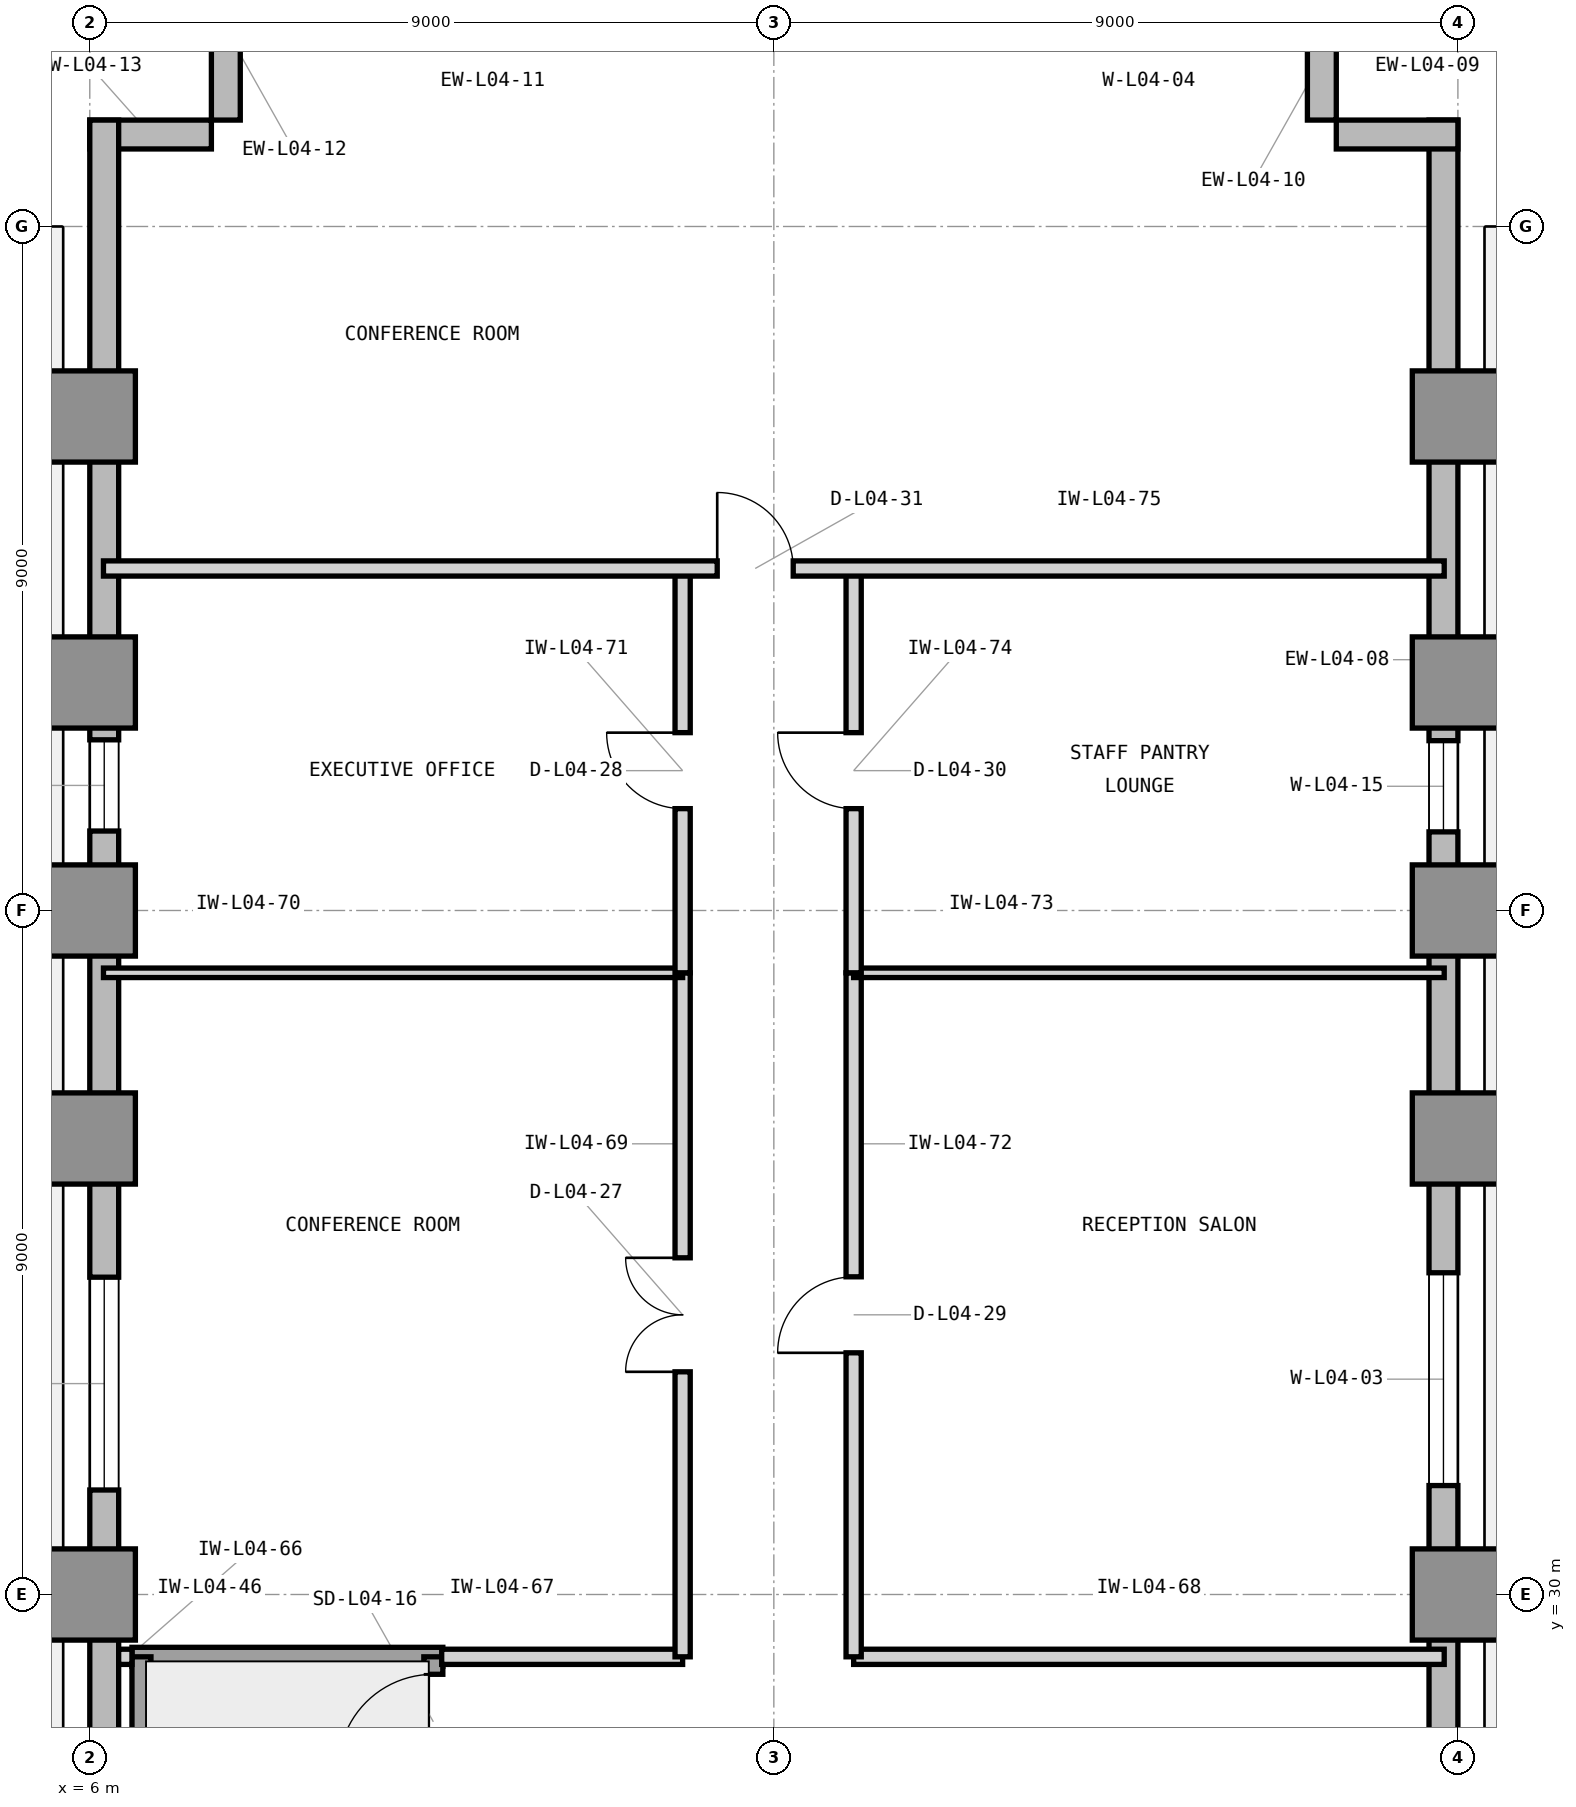
"""IFC4 building model, lengths in metres.
Left out: names, types, materials, properties, quantities, classifications, styles, units other than length and angle.
Written with IfcOpenShell. Run it as: python <this file> out.ifc"""

import sys

from ifc_helpers import new_model, si_unit, direction, frame, frame_2d, origin, origin_2d, place, context, subcontext, project, spatial, rectangle, extrude, element, fill, save


model = new_model("IFC4")
c1 = context("Model", 3, precision=1e-05, world=origin(), true_north=direction((0.0, 1.0)))
c2 = subcontext(c1, "Body", "Model", "MODEL_VIEW")
j1 = project(units=[si_unit("LENGTHUNIT", "METRE"), si_unit("PLANEANGLEUNIT", "RADIAN")], contexts=[c1])
p1 = place(None, origin())
s1 = spatial("IfcSite", under=j1, at=p1, CompositionType="ELEMENT")
p2 = place(p1, origin())
s2 = spatial("IfcBuilding", under=s1, at=p2, CompositionType="ELEMENT")
p3 = place(p2, frame((0.0, 0.0, 21.6)))
s3 = spatial("IfcBuildingStorey", under=s2, at=p3, CompositionType="ELEMENT", Elevation=21.6)
for number, where, z_axis, x_axis in (
    (1, (6.0, 30.0, 0.0), (0.0, 0.0, 1.0), (1.0, 0.0, 0.0)),
    (2, (24.0, 30.0, 0.0), (0.0, 0.0, 1.0), (1.0, 0.0, 0.0)),
    (3, (6.0, 36.0, 0.0), (0.0, 0.0, 1.0), (1.0, 0.0, 0.0)),
    (4, (24.0, 36.0, 0.0), (0.0, 0.0, 1.0), (1.0, 0.0, 0.0)),
    (5, (6.0, 39.0, 0.0), (0.0, 0.0, 1.0), (1.0, 0.0, 0.0)),
    (6, (24.0, 39.0, 0.0), (0.0, 0.0, 1.0), (1.0, 0.0, 0.0)),
    (7, (6.0, 42.0, 0.0), (0.0, 0.0, 1.0), (1.0, 0.0, 0.0)),
    (8, (24.0, 42.0, 0.0), (0.0, 0.0, 1.0), (1.0, 0.0, 0.0)),
    (9, (6.0, 45.5, 0.0), (0.0, 0.0, 1.0), (1.0, 0.0, 0.0)),
    (10, (24.0, 45.5, 0.0), (0.0, 0.0, 1.0), (1.0, 0.0, 0.0)),
):
    element("IfcColumn", number, at=place(p3, frame(where, z_axis=z_axis, x_axis=x_axis)), inside=s3, PredefinedType="COLUMN", context=c2, shape_type="SweptSolid", body=[
        extrude(rectangle(XDim=1.2, YDim=1.2, at=origin_2d()), origin(), (0.0, 0.0, 1.0), 4.2),
    ])
p4 = place(p3, frame((23.81, 21.0, 0.0), z_axis=(0.0, 0.0, 1.0), x_axis=(0.0, 1.0, 0.0)))
e11 = element("IfcWall", 11, at=p4, inside=s3, PredefinedType="STANDARD", context=c2, shape_type="SweptSolid", body=[
    extrude(rectangle(XDim=28.4, YDim=0.38, at=frame_2d((14.2, 0.0))), origin(), (0.0, 0.0, 1.0), 3.98),
])
p5 = place(p4, frame((10.433, 0.0, 0.85)))
e12 = element("IfcOpeningElement", 12, at=p5, cuts=e11, PredefinedType="OPENING", context=c2, shape_type="SweptSolid", body=[
    extrude(rectangle(XDim=2.8, YDim=2.45, at=frame_2d((1.4, 1.225))), frame((0.0, 0.2, 0.0), z_axis=(0.0, -1.0, 0.0), x_axis=(1.0, 0.0, 0.0)), (0.0, 0.0, 1.0), 0.4),
])
p6 = place(p4, frame((19.034, 0.0, 0.85)))
e13 = element("IfcOpeningElement", 13, at=p6, cuts=e11, PredefinedType="OPENING", context=c2, shape_type="SweptSolid", body=[
    extrude(rectangle(XDim=1.2, YDim=2.45, at=frame_2d((0.6, 1.225))), frame((0.0, 0.2, 0.0), z_axis=(0.0, -1.0, 0.0), x_axis=(1.0, 0.0, 0.0)), (0.0, 0.0, 1.0), 0.4),
])
for number, where, z_axis, x_axis in (
    (14, (24.0, 49.21, 0.0), (0.0, 0.0, 1.0), (-1.0, 0.0, 0.0)),
    (15, (22.21, 49.4, 0.0), (0.0, 0.0, 1.0), (0.0, 1.0, 0.0)),
    (16, (7.79, 51.0, 0.0), (0.0, 0.0, 1.0), (0.0, -1.0, 0.0)),
    (17, (7.6, 49.21, 0.0), (0.0, 0.0, 1.0), (-1.0, 0.0, 0.0)),
):
    element("IfcWall", number, at=place(p3, frame(where, z_axis=z_axis, x_axis=x_axis)), inside=s3, PredefinedType="STANDARD", context=c2, shape_type="SweptSolid", body=[
        extrude(rectangle(XDim=1.6, YDim=0.38, at=frame_2d((0.8, 0.0))), origin(), (0.0, 0.0, 1.0), 3.98),
    ])
p7 = place(p3, frame((6.19, 49.4, 0.0), z_axis=(0.0, 0.0, 1.0), x_axis=(0.0, -1.0, 0.0)))
e18 = element("IfcWall", 18, at=p7, inside=s3, PredefinedType="STANDARD", context=c2, shape_type="SweptSolid", body=[
    extrude(rectangle(XDim=28.5, YDim=0.38, at=frame_2d((14.25, 0.0))), origin(), (0.0, 0.0, 1.0), 3.98),
])
p8 = place(p7, frame((15.225, 0.0, 0.85)))
e19 = element("IfcOpeningElement", 19, at=p8, cuts=e18, PredefinedType="OPENING", context=c2, shape_type="SweptSolid", body=[
    extrude(rectangle(XDim=2.8, YDim=2.45, at=frame_2d((1.4, 1.225))), frame((0.0, 0.2, 0.0), z_axis=(0.0, -1.0, 0.0), x_axis=(1.0, 0.0, 0.0)), (0.0, 0.0, 1.0), 0.4),
])
p9 = place(p7, frame((8.154, 0.0, 0.85)))
e20 = element("IfcOpeningElement", 20, at=p9, cuts=e18, PredefinedType="OPENING", context=c2, shape_type="SweptSolid", body=[
    extrude(rectangle(XDim=1.2, YDim=2.45, at=frame_2d((0.6, 1.225))), frame((0.0, 0.2, 0.0), z_axis=(0.0, -1.0, 0.0), x_axis=(1.0, 0.0, 0.0)), (0.0, 0.0, 1.0), 0.4),
])
p10 = place(p3, frame((6.555, 29.18, 0.0), z_axis=(0.0, 0.0, 1.0), x_axis=(1.0, 0.0, 0.0)))
e21 = element("IfcWall", 21, at=p10, inside=s3, PredefinedType="SHEAR", context=c2, shape_type="SweptSolid", body=[
    extrude(rectangle(XDim=4.09, YDim=0.25, at=frame_2d((2.045, 0.0))), origin(), (0.0, 0.0, 1.0), 4.2),
])
p11 = place(p3, frame((6.68, 21.68, 0.0), z_axis=(0.0, 0.0, 1.0), x_axis=(0.0, 1.0, 0.0)))
e22 = element("IfcWall", 22, at=p11, inside=s3, PredefinedType="SHEAR", context=c2, shape_type="SweptSolid", body=[
    extrude(rectangle(XDim=7.5, YDim=0.25, at=frame_2d((3.75, 0.0))), origin(), (0.0, 0.0, 1.0), 4.2),
])
p12 = place(p3, frame((10.52, 21.68, 0.0), z_axis=(0.0, 0.0, 1.0), x_axis=(0.0, 1.0, 0.0)))
e23 = element("IfcWall", 23, at=p12, inside=s3, PredefinedType="SHEAR", context=c2, shape_type="SweptSolid", body=[
    extrude(rectangle(XDim=7.5, YDim=0.25, at=frame_2d((3.75, 0.0))), origin(), (0.0, 0.0, 1.0), 4.2),
])
p13 = place(p12, frame((6.02, 0.0, 0.0)))
e24 = element("IfcOpeningElement", 24, at=p13, cuts=e23, PredefinedType="OPENING", context=c2, shape_type="SweptSolid", body=[
    extrude(rectangle(XDim=1.25, YDim=2.2, at=frame_2d((0.625, 1.1))), frame((0.0, 0.135, 0.0), z_axis=(0.0, -1.0, 0.0), x_axis=(1.0, 0.0, 0.0)), (0.0, 0.0, 1.0), 0.27),
])
p14 = place(p3, frame((6.38, 29.18, 0.0), z_axis=(0.0, 0.0, 1.0), x_axis=(1.0, 0.0, 0.0)))
e25 = element("IfcWall", 25, at=p14, inside=s3, PredefinedType="PARTITIONING", context=c2, shape_type="SweptSolid", body=[
    extrude(rectangle(XDim=0.175, YDim=0.2, at=frame_2d((0.087, 0.0))), origin(), (0.0, 0.0, 1.0), 3.97),
])
p15 = place(p3, frame((10.63, 29.18, 0.0), z_axis=(0.0, 0.0, 1.0), x_axis=(1.0, 0.0, 0.0)))
e26 = element("IfcWall", 26, at=p15, inside=s3, PredefinedType="PARTITIONING", context=c2, shape_type="SweptSolid", body=[
    extrude(rectangle(XDim=3.17, YDim=0.2, at=frame_2d((1.585, 0.0))), origin(), (0.0, 0.0, 1.0), 3.97),
])
p16 = place(p3, frame((16.05, 29.18, 0.0), z_axis=(0.0, 0.0, 1.0), x_axis=(1.0, 0.0, 0.0)))
e27 = element("IfcWall", 27, at=p16, inside=s3, PredefinedType="PARTITIONING", context=c2, shape_type="SweptSolid", body=[
    extrude(rectangle(XDim=7.77, YDim=0.2, at=frame_2d((3.885, 0.0))), origin(), (0.0, 0.0, 1.0), 3.97),
])
p17 = place(p3, frame((13.8, 29.18, 0.0), z_axis=(0.0, 0.0, 1.0), x_axis=(0.0, 1.0, 0.0)))
e28 = element("IfcWall", 28, at=p17, inside=s3, PredefinedType="PARTITIONING", context=c2, shape_type="SweptSolid", body=[
    extrude(rectangle(XDim=9.0, YDim=0.2, at=frame_2d((4.5, 0.0))), origin(), (0.0, 0.0, 1.0), 3.97),
])
p18 = place(p17, frame((3.75, 0.0, 0.0)))
e29 = element("IfcOpeningElement", 29, at=p18, cuts=e28, PredefinedType="OPENING", context=c2, shape_type="SweptSolid", body=[
    extrude(rectangle(XDim=1.5, YDim=2.3, at=frame_2d((0.75, 1.15))), frame((0.0, 0.11, 0.0), z_axis=(0.0, -1.0, 0.0), x_axis=(1.0, 0.0, 0.0)), (0.0, 0.0, 1.0), 0.22),
])
p19 = place(p3, frame((6.18, 38.18, 0.0), z_axis=(0.0, 0.0, 1.0), x_axis=(1.0, 0.0, 0.0)))
e30 = element("IfcWall", 30, at=p19, inside=s3, PredefinedType="PARTITIONING", context=c2, shape_type="SweptSolid", body=[
    extrude(rectangle(XDim=7.62, YDim=0.125, at=frame_2d((3.81, 0.0))), origin(), (0.0, 0.0, 1.0), 3.97),
])
p20 = place(p3, frame((13.8, 38.18, 0.0), z_axis=(0.0, 0.0, 1.0), x_axis=(0.0, 1.0, 0.0)))
e31 = element("IfcWall", 31, at=p20, inside=s3, PredefinedType="PARTITIONING", context=c2, shape_type="SweptSolid", body=[
    extrude(rectangle(XDim=5.32, YDim=0.2, at=frame_2d((2.66, 0.0))), origin(), (0.0, 0.0, 1.0), 3.97),
])
p21 = place(p20, frame((2.16, 0.0, 0.0)))
e32 = element("IfcOpeningElement", 32, at=p21, cuts=e31, PredefinedType="OPENING", context=c2, shape_type="SweptSolid", body=[
    extrude(rectangle(XDim=1.0, YDim=2.15, at=frame_2d((0.5, 1.075))), frame((0.0, 0.11, 0.0), z_axis=(0.0, -1.0, 0.0), x_axis=(1.0, 0.0, 0.0)), (0.0, 0.0, 1.0), 0.22),
])
p22 = place(p3, frame((16.05, 29.18, 0.0), z_axis=(0.0, 0.0, 1.0), x_axis=(0.0, 1.0, 0.0)))
e33 = element("IfcWall", 33, at=p22, inside=s3, PredefinedType="PARTITIONING", context=c2, shape_type="SweptSolid", body=[
    extrude(rectangle(XDim=9.0, YDim=0.2, at=frame_2d((4.5, 0.0))), origin(), (0.0, 0.0, 1.0), 3.97),
])
p23 = place(p22, frame((4.0, 0.0, 0.0)))
e34 = element("IfcOpeningElement", 34, at=p23, cuts=e33, PredefinedType="OPENING", context=c2, shape_type="SweptSolid", body=[
    extrude(rectangle(XDim=1.0, YDim=2.15, at=frame_2d((0.5, 1.075))), frame((0.0, 0.11, 0.0), z_axis=(0.0, -1.0, 0.0), x_axis=(1.0, 0.0, 0.0)), (0.0, 0.0, 1.0), 0.22),
])
p24 = place(p3, frame((16.05, 38.18, 0.0), z_axis=(0.0, 0.0, 1.0), x_axis=(1.0, 0.0, 0.0)))
e35 = element("IfcWall", 35, at=p24, inside=s3, PredefinedType="PARTITIONING", context=c2, shape_type="SweptSolid", body=[
    extrude(rectangle(XDim=7.77, YDim=0.125, at=frame_2d((3.885, 0.0))), origin(), (0.0, 0.0, 1.0), 3.97),
])
p25 = place(p3, frame((16.05, 38.18, 0.0), z_axis=(0.0, 0.0, 1.0), x_axis=(0.0, 1.0, 0.0)))
e36 = element("IfcWall", 36, at=p25, inside=s3, PredefinedType="PARTITIONING", context=c2, shape_type="SweptSolid", body=[
    extrude(rectangle(XDim=5.32, YDim=0.2, at=frame_2d((2.66, 0.0))), origin(), (0.0, 0.0, 1.0), 3.97),
])
p26 = place(p25, frame((2.16, 0.0, 0.0)))
e37 = element("IfcOpeningElement", 37, at=p26, cuts=e36, PredefinedType="OPENING", context=c2, shape_type="SweptSolid", body=[
    extrude(rectangle(XDim=1.0, YDim=2.15, at=frame_2d((0.5, 1.075))), frame((0.0, 0.11, 0.0), z_axis=(0.0, -1.0, 0.0), x_axis=(1.0, 0.0, 0.0)), (0.0, 0.0, 1.0), 0.22),
])
p27 = place(p3, frame((6.18, 43.5, 0.0), z_axis=(0.0, 0.0, 1.0), x_axis=(1.0, 0.0, 0.0)))
e38 = element("IfcWall", 38, at=p27, inside=s3, PredefinedType="PARTITIONING", context=c2, shape_type="SweptSolid", body=[
    extrude(rectangle(XDim=17.64, YDim=0.2, at=frame_2d((8.82, 0.0))), origin(), (0.0, 0.0, 1.0), 3.97),
])
p28 = place(p27, frame((8.075, 0.0, 0.0)))
e39 = element("IfcOpeningElement", 39, at=p28, cuts=e38, PredefinedType="OPENING", context=c2, shape_type="SweptSolid", body=[
    extrude(rectangle(XDim=1.0, YDim=2.15, at=frame_2d((0.5, 1.075))), frame((0.0, 0.11, 0.0), z_axis=(0.0, -1.0, 0.0), x_axis=(1.0, 0.0, 0.0)), (0.0, 0.0, 1.0), 0.22),
])
p29 = place(p5, origin())
e40 = element("IfcWindow", 40, at=p29, inside=s3, PartitioningType="SINGLE_PANEL", PredefinedType="WINDOW", context=c2, shape_type="SweptSolid", body=[
    extrude(rectangle(XDim=2.8, YDim=2.45, at=frame_2d((1.4, 1.225))), frame((0.0, 0.11, 0.0), z_axis=(0.0, -1.0, 0.0), x_axis=(1.0, 0.0, 0.0)), (0.0, 0.0, 1.0), 0.06),
])
fill(e12, e40)
p30 = place(p8, origin())
e41 = element("IfcWindow", 41, at=p30, inside=s3, PartitioningType="SINGLE_PANEL", PredefinedType="WINDOW", context=c2, shape_type="SweptSolid", body=[
    extrude(rectangle(XDim=2.8, YDim=2.45, at=frame_2d((1.4, 1.225))), frame((0.0, 0.11, 0.0), z_axis=(0.0, -1.0, 0.0), x_axis=(1.0, 0.0, 0.0)), (0.0, 0.0, 1.0), 0.06),
])
fill(e19, e41)
p31 = place(p13, origin())
e42 = element("IfcDoor", 42, at=p31, inside=s3, OperationType="SINGLE_SWING_LEFT", PredefinedType="DOOR", context=c2, shape_type="SweptSolid", body=[
    extrude(rectangle(XDim=1.25, YDim=2.2, at=frame_2d((0.625, 1.1))), frame((0.0, 0.025, 0.0), z_axis=(0.0, -1.0, 0.0), x_axis=(1.0, 0.0, 0.0)), (0.0, 0.0, 1.0), 0.05),
])
fill(e24, e42)
p32 = place(p18, origin())
e43 = element("IfcDoor", 43, at=p32, inside=s3, OperationType="DOUBLE_DOOR_SINGLE_SWING", PredefinedType="DOOR", context=c2, shape_type="SweptSolid", body=[
    extrude(rectangle(XDim=1.5, YDim=2.3, at=frame_2d((0.75, 1.15))), frame((0.0, 0.025, 0.0), z_axis=(0.0, -1.0, 0.0), x_axis=(1.0, 0.0, 0.0)), (0.0, 0.0, 1.0), 0.05),
])
fill(e29, e43)
p33 = place(p21, origin())
e44 = element("IfcDoor", 44, at=p33, inside=s3, OperationType="SINGLE_SWING_RIGHT", PredefinedType="DOOR", context=c2, shape_type="SweptSolid", body=[
    extrude(rectangle(XDim=1.0, YDim=2.15, at=frame_2d((0.5, 1.075))), frame((0.0, 0.025, 0.0), z_axis=(0.0, -1.0, 0.0), x_axis=(1.0, 0.0, 0.0)), (0.0, 0.0, 1.0), 0.05),
])
fill(e32, e44)
p34 = place(p23, origin())
e45 = element("IfcDoor", 45, at=p34, inside=s3, OperationType="SINGLE_SWING_LEFT", PredefinedType="DOOR", context=c2, shape_type="SweptSolid", body=[
    extrude(rectangle(XDim=1.0, YDim=2.15, at=frame_2d((0.5, 1.075))), frame((0.0, 0.025, 0.0), z_axis=(0.0, -1.0, 0.0), x_axis=(1.0, 0.0, 0.0)), (0.0, 0.0, 1.0), 0.05),
])
fill(e34, e45)
p35 = place(p26, origin())
e46 = element("IfcDoor", 46, at=p35, inside=s3, OperationType="SINGLE_SWING_RIGHT", PredefinedType="DOOR", context=c2, shape_type="SweptSolid", body=[
    extrude(rectangle(XDim=1.0, YDim=2.15, at=frame_2d((0.5, 1.075))), frame((0.0, 0.025, 0.0), z_axis=(0.0, -1.0, 0.0), x_axis=(1.0, 0.0, 0.0)), (0.0, 0.0, 1.0), 0.05),
])
fill(e37, e46)
p36 = place(p28, origin())
e47 = element("IfcDoor", 47, at=p36, inside=s3, OperationType="SINGLE_SWING_LEFT", PredefinedType="DOOR", context=c2, shape_type="SweptSolid", body=[
    extrude(rectangle(XDim=1.0, YDim=2.15, at=frame_2d((0.5, 1.075))), frame((0.0, 0.025, 0.0), z_axis=(0.0, -1.0, 0.0), x_axis=(1.0, 0.0, 0.0)), (0.0, 0.0, 1.0), 0.05),
])
fill(e39, e47)
p37 = place(p9, origin())
e48 = element("IfcWindow", 48, at=p37, inside=s3, PartitioningType="SINGLE_PANEL", PredefinedType="WINDOW", context=c2, shape_type="SweptSolid", body=[
    extrude(rectangle(XDim=1.2, YDim=2.45, at=frame_2d((0.6, 1.225))), frame((0.0, 0.11, 0.0), z_axis=(0.0, -1.0, 0.0), x_axis=(1.0, 0.0, 0.0)), (0.0, 0.0, 1.0), 0.06),
])
fill(e20, e48)
p38 = place(p6, origin())
e49 = element("IfcWindow", 49, at=p38, inside=s3, PartitioningType="SINGLE_PANEL", PredefinedType="WINDOW", context=c2, shape_type="SweptSolid", body=[
    extrude(rectangle(XDim=1.2, YDim=2.45, at=frame_2d((0.6, 1.225))), frame((0.0, 0.11, 0.0), z_axis=(0.0, -1.0, 0.0), x_axis=(1.0, 0.0, 0.0)), (0.0, 0.0, 1.0), 0.06),
])
fill(e13, e49)
save(model, sys.argv[1])
